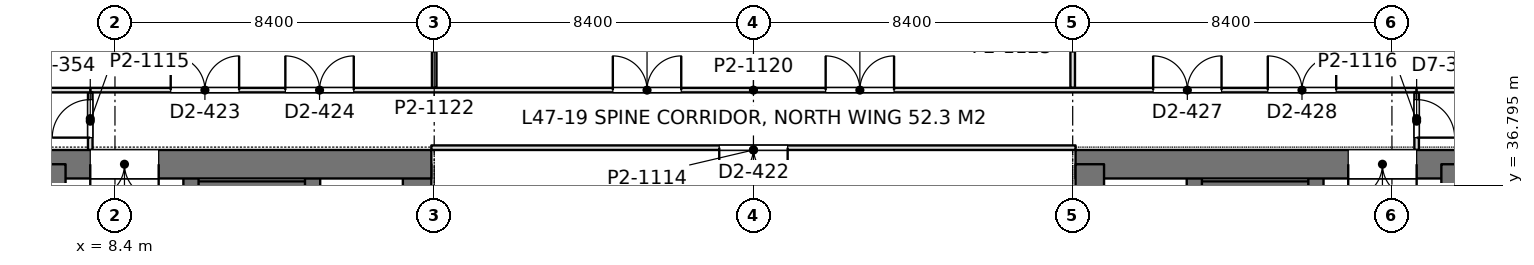
"""IFC4 building model, lengths in metres.
Left out: names, types, materials, properties, quantities, classifications, styles, units other than length and angle.
Written with IfcOpenShell. Run it as: python <this file> out.ifc"""

import sys

from ifc_helpers import new_model, si_unit, direction, frame, frame_2d, origin, place, context, subcontext, project, spatial, rectangle, extrude, element, fill, save


model = new_model("IFC4")
c1 = context("Model", 3, precision=1e-05, world=origin(), true_north=direction((0.0, 1.0)))
c2 = subcontext(c1, "Body", "Model", "MODEL_VIEW")
j1 = project(units=[si_unit("LENGTHUNIT", "METRE"), si_unit("PLANEANGLEUNIT", "RADIAN")], contexts=[c1])
p1 = place(None, origin())
s1 = spatial("IfcSite", under=j1, at=p1, CompositionType="ELEMENT")
p2 = place(p1, origin())
s2 = spatial("IfcBuilding", under=s1, at=p2, CompositionType="ELEMENT")
p3 = place(p2, frame((0.0, 0.0, 207.0)))
s3 = spatial("IfcBuildingStorey", under=s2, at=p3, CompositionType="ELEMENT", Elevation=207.0)
p4 = place(p3, frame((-1.125, 37.35, 0.0), z_axis=(0.0, 0.0, 1.0), x_axis=(1.0, 0.0, 0.0)))
e1 = element("IfcWall", 1, at=p4, inside=s3, PredefinedType="SHEAR", context=c2, shape_type="SweptSolid", body=[
    extrude(rectangle(XDim=17.85, YDim=0.75, at=frame_2d((8.925, 0.0))), origin(), (0.0, 0.0, 1.0), 4.2),
])
p5 = place(p4, frame((8.875, 0.0, 0.0)))
e2 = element("IfcOpeningElement", 2, at=p5, cuts=e1, PredefinedType="OPENING", context=c2, shape_type="SweptSolid", body=[
    extrude(rectangle(XDim=1.8, YDim=2.4, at=frame_2d((0.9, 1.2))), frame((0.0, 0.385, 0.0), z_axis=(0.0, -1.0, 0.0), x_axis=(1.0, 0.0, 0.0)), (0.0, 0.0, 1.0), 0.77),
])
p6 = place(p3, frame((16.35, 27.8, 0.0), z_axis=(0.0, 0.0, 1.0), x_axis=(0.0, 1.0, 0.0)))
e3 = element("IfcWall", 3, at=p6, inside=s3, PredefinedType="SHEAR", context=c2, shape_type="SweptSolid", body=[
    extrude(rectangle(XDim=9.55, YDim=0.75, at=frame_2d((4.775, 0.0))), origin(), (0.0, 0.0, 1.0), 4.2),
])
p7 = place(p3, frame((6.9, 13.05, 0.0), z_axis=(0.0, 0.0, 1.0), x_axis=(0.0, 1.0, 0.0)))
e4 = element("IfcWall", 4, at=p7, inside=s3, PredefinedType="SHEAR", context=c2, shape_type="SweptSolid", body=[
    extrude(rectangle(XDim=24.3, YDim=0.4, at=frame_2d((12.15, 0.0))), origin(), (0.0, 0.0, 1.0), 4.2),
])
p8 = place(p7, frame((1.3, 0.0, 0.0)))
e5 = element("IfcOpeningElement", 5, at=p8, cuts=e4, PredefinedType="OPENING", context=c2, shape_type="SweptSolid", body=[
    extrude(rectangle(XDim=1.0, YDim=2.2, at=frame_2d((0.5, 1.1))), frame((0.0, 0.21, 0.0), z_axis=(0.0, -1.0, 0.0), x_axis=(1.0, 0.0, 0.0)), (0.0, 0.0, 1.0), 0.42),
])
p9 = place(p7, frame((22.0, 0.0, 0.0)))
e6 = element("IfcOpeningElement", 6, at=p9, cuts=e4, PredefinedType="OPENING", context=c2, shape_type="SweptSolid", body=[
    extrude(rectangle(XDim=1.0, YDim=2.2, at=frame_2d((0.5, 1.1))), frame((0.0, 0.21, 0.0), z_axis=(0.0, -1.0, 0.0), x_axis=(1.0, 0.0, 0.0)), (0.0, 0.0, 1.0), 0.42),
])
p10 = place(p7, frame((5.55, 0.0, 0.0)))
e7 = element("IfcOpeningElement", 7, at=p10, cuts=e4, PredefinedType="OPENING", context=c2, shape_type="SweptSolid", body=[
    extrude(rectangle(XDim=1.0, YDim=2.2, at=frame_2d((0.5, 1.1))), frame((0.0, 0.21, 0.0), z_axis=(0.0, -1.0, 0.0), x_axis=(1.0, 0.0, 0.0)), (0.0, 0.0, 1.0), 0.42),
])
p11 = place(p7, frame((9.55, 0.0, 0.0)))
e8 = element("IfcOpeningElement", 8, at=p11, cuts=e4, PredefinedType="OPENING", context=c2, shape_type="SweptSolid", body=[
    extrude(rectangle(XDim=1.0, YDim=2.2, at=frame_2d((0.5, 1.1))), frame((0.0, 0.21, 0.0), z_axis=(0.0, -1.0, 0.0), x_axis=(1.0, 0.0, 0.0)), (0.0, 0.0, 1.0), 0.42),
])
p12 = place(p7, frame((12.8, 0.0, 0.0)))
e9 = element("IfcOpeningElement", 9, at=p12, cuts=e4, PredefinedType="OPENING", context=c2, shape_type="SweptSolid", body=[
    extrude(rectangle(XDim=1.1, YDim=2.2, at=frame_2d((0.55, 1.1))), frame((0.0, 0.21, 0.0), z_axis=(0.0, -1.0, 0.0), x_axis=(1.0, 0.0, 0.0)), (0.0, 0.0, 1.0), 0.42),
])
p13 = place(p7, frame((15.538, 0.0, 0.0)))
e10 = element("IfcOpeningElement", 10, at=p13, cuts=e4, PredefinedType="OPENING", context=c2, shape_type="SweptSolid", body=[
    extrude(rectangle(XDim=1.1, YDim=2.2, at=frame_2d((0.55, 1.1))), frame((0.0, 0.21, 0.0), z_axis=(0.0, -1.0, 0.0), x_axis=(1.0, 0.0, 0.0)), (0.0, 0.0, 1.0), 0.42),
])
p14 = place(p7, frame((18.262, 0.0, 0.0)))
e11 = element("IfcOpeningElement", 11, at=p14, cuts=e4, PredefinedType="OPENING", context=c2, shape_type="SweptSolid", body=[
    extrude(rectangle(XDim=1.1, YDim=2.2, at=frame_2d((0.55, 1.1))), frame((0.0, 0.21, 0.0), z_axis=(0.0, -1.0, 0.0), x_axis=(1.0, 0.0, 0.0)), (0.0, 0.0, 1.0), 0.42),
])
p15 = place(p3, frame((10.4, 13.05, 0.0), z_axis=(0.0, 0.0, 1.0), x_axis=(0.0, 1.0, 0.0)))
e12 = element("IfcWall", 12, at=p15, inside=s3, PredefinedType="SHEAR", context=c2, shape_type="SweptSolid", body=[
    extrude(rectangle(XDim=24.3, YDim=0.4, at=frame_2d((12.15, 0.0))), origin(), (0.0, 0.0, 1.0), 4.2),
])
p16 = place(p15, frame((15.75, 0.0, 0.0)))
e13 = element("IfcOpeningElement", 13, at=p16, cuts=e12, PredefinedType="OPENING", context=c2, shape_type="SweptSolid", body=[
    extrude(rectangle(XDim=1.1, YDim=2.2, at=frame_2d((0.55, 1.1))), frame((0.0, 0.21, 0.0), z_axis=(0.0, -1.0, 0.0), x_axis=(1.0, 0.0, 0.0)), (0.0, 0.0, 1.0), 0.42),
])
p17 = place(p15, frame((18.6, 0.0, 0.0)))
e14 = element("IfcOpeningElement", 14, at=p17, cuts=e12, PredefinedType="OPENING", context=c2, shape_type="SweptSolid", body=[
    extrude(rectangle(XDim=1.1, YDim=2.2, at=frame_2d((0.55, 1.1))), frame((0.0, 0.21, 0.0), z_axis=(0.0, -1.0, 0.0), x_axis=(1.0, 0.0, 0.0)), (0.0, 0.0, 1.0), 0.42),
])
p18 = place(p15, frame((21.45, 0.0, 0.0)))
e15 = element("IfcOpeningElement", 15, at=p18, cuts=e12, PredefinedType="OPENING", context=c2, shape_type="SweptSolid", body=[
    extrude(rectangle(XDim=1.1, YDim=2.2, at=frame_2d((0.55, 1.1))), frame((0.0, 0.21, 0.0), z_axis=(0.0, -1.0, 0.0), x_axis=(1.0, 0.0, 0.0)), (0.0, 0.0, 1.0), 0.42),
])
p19 = place(p15, frame((8.65, 0.0, 0.0)))
e16 = element("IfcOpeningElement", 16, at=p19, cuts=e12, PredefinedType="OPENING", context=c2, shape_type="SweptSolid", body=[
    extrude(rectangle(XDim=1.8, YDim=2.4, at=frame_2d((0.9, 1.2))), frame((0.0, 0.21, 0.0), z_axis=(0.0, -1.0, 0.0), x_axis=(1.0, 0.0, 0.0)), (0.0, 0.0, 1.0), 0.42),
])
p20 = place(p3, frame((13.6, 27.925, 0.0), z_axis=(0.0, 0.0, 1.0), x_axis=(0.0, 1.0, 0.0)))
e17 = element("IfcWall", 17, at=p20, inside=s3, PredefinedType="SHEAR", context=c2, shape_type="SweptSolid", body=[
    extrude(rectangle(XDim=9.425, YDim=0.4, at=frame_2d((4.712, 0.0))), origin(), (0.0, 0.0, 1.0), 4.2),
])
p21 = place(p3, frame((10.4, 36.625, 0.0), z_axis=(0.0, 0.0, 1.0), x_axis=(1.0, 0.0, 0.0)))
e18 = element("IfcWall", 18, at=p21, inside=s3, PredefinedType="SHEAR", context=c2, shape_type="SweptSolid", body=[
    extrude(rectangle(XDim=3.2, YDim=0.55, at=frame_2d((1.6, 0.0))), origin(), (0.0, 0.0, 1.0), 4.2),
])
p22 = place(p3, frame((33.675, 37.35, 0.0), z_axis=(0.0, 0.0, 1.0), x_axis=(1.0, 0.0, 0.0)))
e19 = element("IfcWall", 19, at=p22, inside=s3, PredefinedType="SHEAR", context=c2, shape_type="SweptSolid", body=[
    extrude(rectangle(XDim=17.85, YDim=0.75, at=frame_2d((8.925, 0.0))), origin(), (0.0, 0.0, 1.0), 4.2),
])
p23 = place(p22, frame((7.175, 0.0, 0.0)))
e20 = element("IfcOpeningElement", 20, at=p23, cuts=e19, PredefinedType="OPENING", context=c2, shape_type="SweptSolid", body=[
    extrude(rectangle(XDim=1.8, YDim=2.4, at=frame_2d((0.9, 1.2))), frame((0.0, 0.385, 0.0), z_axis=(0.0, -1.0, 0.0), x_axis=(1.0, 0.0, 0.0)), (0.0, 0.0, 1.0), 0.77),
])
p24 = place(p3, frame((34.05, 27.8, 0.0), z_axis=(0.0, 0.0, 1.0), x_axis=(0.0, 1.0, 0.0)))
e21 = element("IfcWall", 21, at=p24, inside=s3, PredefinedType="SHEAR", context=c2, shape_type="SweptSolid", body=[
    extrude(rectangle(XDim=9.55, YDim=0.75, at=frame_2d((4.775, 0.0))), origin(), (0.0, 0.0, 1.0), 4.2),
])
p25 = place(p3, frame((43.5, 13.05, 0.0), z_axis=(0.0, 0.0, 1.0), x_axis=(0.0, 1.0, 0.0)))
e22 = element("IfcWall", 22, at=p25, inside=s3, PredefinedType="SHEAR", context=c2, shape_type="SweptSolid", body=[
    extrude(rectangle(XDim=24.3, YDim=0.4, at=frame_2d((12.15, 0.0))), origin(), (0.0, 0.0, 1.0), 4.2),
])
p26 = place(p25, frame((1.3, 0.0, 0.0)))
e23 = element("IfcOpeningElement", 23, at=p26, cuts=e22, PredefinedType="OPENING", context=c2, shape_type="SweptSolid", body=[
    extrude(rectangle(XDim=1.0, YDim=2.2, at=frame_2d((0.5, 1.1))), frame((0.0, 0.21, 0.0), z_axis=(0.0, -1.0, 0.0), x_axis=(1.0, 0.0, 0.0)), (0.0, 0.0, 1.0), 0.42),
])
p27 = place(p25, frame((22.0, 0.0, 0.0)))
e24 = element("IfcOpeningElement", 24, at=p27, cuts=e22, PredefinedType="OPENING", context=c2, shape_type="SweptSolid", body=[
    extrude(rectangle(XDim=1.0, YDim=2.2, at=frame_2d((0.5, 1.1))), frame((0.0, 0.21, 0.0), z_axis=(0.0, -1.0, 0.0), x_axis=(1.0, 0.0, 0.0)), (0.0, 0.0, 1.0), 0.42),
])
p28 = place(p25, frame((5.55, 0.0, 0.0)))
e25 = element("IfcOpeningElement", 25, at=p28, cuts=e22, PredefinedType="OPENING", context=c2, shape_type="SweptSolid", body=[
    extrude(rectangle(XDim=1.0, YDim=2.2, at=frame_2d((0.5, 1.1))), frame((0.0, 0.21, 0.0), z_axis=(0.0, -1.0, 0.0), x_axis=(1.0, 0.0, 0.0)), (0.0, 0.0, 1.0), 0.42),
])
p29 = place(p25, frame((9.55, 0.0, 0.0)))
e26 = element("IfcOpeningElement", 26, at=p29, cuts=e22, PredefinedType="OPENING", context=c2, shape_type="SweptSolid", body=[
    extrude(rectangle(XDim=1.0, YDim=2.2, at=frame_2d((0.5, 1.1))), frame((0.0, 0.21, 0.0), z_axis=(0.0, -1.0, 0.0), x_axis=(1.0, 0.0, 0.0)), (0.0, 0.0, 1.0), 0.42),
])
p30 = place(p25, frame((12.8, 0.0, 0.0)))
e27 = element("IfcOpeningElement", 27, at=p30, cuts=e22, PredefinedType="OPENING", context=c2, shape_type="SweptSolid", body=[
    extrude(rectangle(XDim=1.1, YDim=2.2, at=frame_2d((0.55, 1.1))), frame((0.0, 0.21, 0.0), z_axis=(0.0, -1.0, 0.0), x_axis=(1.0, 0.0, 0.0)), (0.0, 0.0, 1.0), 0.42),
])
p31 = place(p25, frame((15.538, 0.0, 0.0)))
e28 = element("IfcOpeningElement", 28, at=p31, cuts=e22, PredefinedType="OPENING", context=c2, shape_type="SweptSolid", body=[
    extrude(rectangle(XDim=1.1, YDim=2.2, at=frame_2d((0.55, 1.1))), frame((0.0, 0.21, 0.0), z_axis=(0.0, -1.0, 0.0), x_axis=(1.0, 0.0, 0.0)), (0.0, 0.0, 1.0), 0.42),
])
p32 = place(p25, frame((18.262, 0.0, 0.0)))
e29 = element("IfcOpeningElement", 29, at=p32, cuts=e22, PredefinedType="OPENING", context=c2, shape_type="SweptSolid", body=[
    extrude(rectangle(XDim=1.1, YDim=2.2, at=frame_2d((0.55, 1.1))), frame((0.0, 0.21, 0.0), z_axis=(0.0, -1.0, 0.0), x_axis=(1.0, 0.0, 0.0)), (0.0, 0.0, 1.0), 0.42),
])
p33 = place(p3, frame((40.0, 13.05, 0.0), z_axis=(0.0, 0.0, 1.0), x_axis=(0.0, 1.0, 0.0)))
e30 = element("IfcWall", 30, at=p33, inside=s3, PredefinedType="SHEAR", context=c2, shape_type="SweptSolid", body=[
    extrude(rectangle(XDim=24.3, YDim=0.4, at=frame_2d((12.15, 0.0))), origin(), (0.0, 0.0, 1.0), 4.2),
])
p34 = place(p33, frame((15.75, 0.0, 0.0)))
e31 = element("IfcOpeningElement", 31, at=p34, cuts=e30, PredefinedType="OPENING", context=c2, shape_type="SweptSolid", body=[
    extrude(rectangle(XDim=1.1, YDim=2.2, at=frame_2d((0.55, 1.1))), frame((0.0, 0.21, 0.0), z_axis=(0.0, -1.0, 0.0), x_axis=(1.0, 0.0, 0.0)), (0.0, 0.0, 1.0), 0.42),
])
p35 = place(p33, frame((18.6, 0.0, 0.0)))
e32 = element("IfcOpeningElement", 32, at=p35, cuts=e30, PredefinedType="OPENING", context=c2, shape_type="SweptSolid", body=[
    extrude(rectangle(XDim=1.1, YDim=2.2, at=frame_2d((0.55, 1.1))), frame((0.0, 0.21, 0.0), z_axis=(0.0, -1.0, 0.0), x_axis=(1.0, 0.0, 0.0)), (0.0, 0.0, 1.0), 0.42),
])
p36 = place(p33, frame((21.45, 0.0, 0.0)))
e33 = element("IfcOpeningElement", 33, at=p36, cuts=e30, PredefinedType="OPENING", context=c2, shape_type="SweptSolid", body=[
    extrude(rectangle(XDim=1.1, YDim=2.2, at=frame_2d((0.55, 1.1))), frame((0.0, 0.21, 0.0), z_axis=(0.0, -1.0, 0.0), x_axis=(1.0, 0.0, 0.0)), (0.0, 0.0, 1.0), 0.42),
])
p37 = place(p33, frame((8.65, 0.0, 0.0)))
e34 = element("IfcOpeningElement", 34, at=p37, cuts=e30, PredefinedType="OPENING", context=c2, shape_type="SweptSolid", body=[
    extrude(rectangle(XDim=1.8, YDim=2.4, at=frame_2d((0.9, 1.2))), frame((0.0, 0.21, 0.0), z_axis=(0.0, -1.0, 0.0), x_axis=(1.0, 0.0, 0.0)), (0.0, 0.0, 1.0), 0.42),
])
p38 = place(p3, frame((36.8, 27.925, 0.0), z_axis=(0.0, 0.0, 1.0), x_axis=(0.0, 1.0, 0.0)))
e35 = element("IfcWall", 35, at=p38, inside=s3, PredefinedType="SHEAR", context=c2, shape_type="SweptSolid", body=[
    extrude(rectangle(XDim=9.425, YDim=0.4, at=frame_2d((4.712, 0.0))), origin(), (0.0, 0.0, 1.0), 4.2),
])
p39 = place(p3, frame((40.0, 36.625, 0.0), z_axis=(0.0, 0.0, 1.0), x_axis=(-1.0, 0.0, 0.0)))
e36 = element("IfcWall", 36, at=p39, inside=s3, PredefinedType="SHEAR", context=c2, shape_type="SweptSolid", body=[
    extrude(rectangle(XDim=3.2, YDim=0.55, at=frame_2d((1.6, 0.0))), origin(), (0.0, 0.0, 1.0), 4.2),
])
for number, where, z_axis, x_axis in (
    (37, (16.8, 39.358, 0.0), (0.0, 0.0, 1.0), (0.0, 1.0, 0.0)),
    (38, (33.6, 39.358, 0.0), (0.0, 0.0, 1.0), (0.0, 1.0, 0.0)),
):
    element("IfcWall", number, at=place(p3, frame(where, z_axis=z_axis, x_axis=x_axis)), inside=s3, PredefinedType="PARTITIONING", context=c2, shape_type="SweptSolid", body=[
        extrude(rectangle(XDim=2.093, YDim=0.12, at=frame_2d((1.046, 0.0))), origin(), (0.0, 0.0, 1.0), 3.69),
    ])
p40 = place(p3, frame((7.748, 39.3, 0.0), z_axis=(0.0, 0.0, 1.0), x_axis=(1.0, 0.0, 0.0)))
e39 = element("IfcWall", 39, at=p40, inside=s3, PredefinedType="PARTITIONING", context=c2, shape_type="SweptSolid", body=[
    extrude(rectangle(XDim=34.904, YDim=0.12, at=frame_2d((17.452, 0.0))), origin(), (0.0, 0.0, 1.0), 3.55),
])
p41 = place(p40, frame((2.119, 0.0, 0.0)))
e40 = element("IfcOpeningElement", 40, at=p41, cuts=e39, PredefinedType="OPENING", context=c2, shape_type="SweptSolid", body=[
    extrude(rectangle(XDim=1.8, YDim=2.2, at=frame_2d((0.9, 1.1))), frame((0.0, 0.07, 0.0), z_axis=(0.0, -1.0, 0.0), x_axis=(1.0, 0.0, 0.0)), (0.0, 0.0, 1.0), 0.14),
])
p42 = place(p40, frame((5.135, 0.0, 0.0)))
e41 = element("IfcOpeningElement", 41, at=p42, cuts=e39, PredefinedType="OPENING", context=c2, shape_type="SweptSolid", body=[
    extrude(rectangle(XDim=1.8, YDim=2.2, at=frame_2d((0.9, 1.1))), frame((0.0, 0.07, 0.0), z_axis=(0.0, -1.0, 0.0), x_axis=(1.0, 0.0, 0.0)), (0.0, 0.0, 1.0), 0.14),
])
p43 = place(p40, frame((13.752, 0.0, 0.0)))
e42 = element("IfcOpeningElement", 42, at=p43, cuts=e39, PredefinedType="OPENING", context=c2, shape_type="SweptSolid", body=[
    extrude(rectangle(XDim=1.8, YDim=2.2, at=frame_2d((0.9, 1.1))), frame((0.0, 0.07, 0.0), z_axis=(0.0, -1.0, 0.0), x_axis=(1.0, 0.0, 0.0)), (0.0, 0.0, 1.0), 0.14),
])
p44 = place(p40, frame((19.352, 0.0, 0.0)))
e43 = element("IfcOpeningElement", 43, at=p44, cuts=e39, PredefinedType="OPENING", context=c2, shape_type="SweptSolid", body=[
    extrude(rectangle(XDim=1.8, YDim=2.2, at=frame_2d((0.9, 1.1))), frame((0.0, 0.07, 0.0), z_axis=(0.0, -1.0, 0.0), x_axis=(1.0, 0.0, 0.0)), (0.0, 0.0, 1.0), 0.14),
])
p45 = place(p40, frame((27.969, 0.0, 0.0)))
e44 = element("IfcOpeningElement", 44, at=p45, cuts=e39, PredefinedType="OPENING", context=c2, shape_type="SweptSolid", body=[
    extrude(rectangle(XDim=1.8, YDim=2.2, at=frame_2d((0.9, 1.1))), frame((0.0, 0.07, 0.0), z_axis=(0.0, -1.0, 0.0), x_axis=(1.0, 0.0, 0.0)), (0.0, 0.0, 1.0), 0.14),
])
p46 = place(p40, frame((30.985, 0.0, 0.0)))
e45 = element("IfcOpeningElement", 45, at=p46, cuts=e39, PredefinedType="OPENING", context=c2, shape_type="SweptSolid", body=[
    extrude(rectangle(XDim=1.8, YDim=2.2, at=frame_2d((0.9, 1.1))), frame((0.0, 0.07, 0.0), z_axis=(0.0, -1.0, 0.0), x_axis=(1.0, 0.0, 0.0)), (0.0, 0.0, 1.0), 0.14),
])
p47 = place(p3, frame((7.75, 37.724, 0.0), z_axis=(0.0, 0.0, 1.0), x_axis=(0.0, 1.0, 0.0)))
e46 = element("IfcWall", 46, at=p47, inside=s3, PredefinedType="PARTITIONING", context=c2, shape_type="SweptSolid", body=[
    extrude(rectangle(XDim=1.518, YDim=0.12, at=frame_2d((0.759, 0.0))), origin(), (0.0, 0.0, 1.0), 4.05),
])
p48 = place(p47, frame((0.326, 0.0, 0.0)))
e47 = element("IfcOpeningElement", 47, at=p48, cuts=e46, PredefinedType="OPENING", context=c2, shape_type="SweptSolid", body=[
    extrude(rectangle(XDim=1.0, YDim=2.4, at=frame_2d((0.5, 1.2))), frame((0.0, 0.07, 0.0), z_axis=(0.0, -1.0, 0.0), x_axis=(1.0, 0.0, 0.0)), (0.0, 0.0, 1.0), 0.14),
])
p49 = place(p3, frame((42.65, 37.724, 0.0), z_axis=(0.0, 0.0, 1.0), x_axis=(0.0, 1.0, 0.0)))
e48 = element("IfcWall", 48, at=p49, inside=s3, PredefinedType="PARTITIONING", context=c2, shape_type="SweptSolid", body=[
    extrude(rectangle(XDim=1.518, YDim=0.12, at=frame_2d((0.759, 0.0))), origin(), (0.0, 0.0, 1.0), 4.05),
])
p50 = place(p49, frame((0.326, 0.0, 0.0)))
e49 = element("IfcOpeningElement", 49, at=p50, cuts=e48, PredefinedType="OPENING", context=c2, shape_type="SweptSolid", body=[
    extrude(rectangle(XDim=1.0, YDim=2.4, at=frame_2d((0.5, 1.2))), frame((0.0, 0.07, 0.0), z_axis=(0.0, -1.0, 0.0), x_axis=(1.0, 0.0, 0.0)), (0.0, 0.0, 1.0), 0.14),
])
for number, where, z_axis, x_axis in (
    (50, (1.2, 39.3, 0.0), (0.0, 0.0, 1.0), (1.0, 0.0, 0.0)),
    (51, (42.648, 39.3, 0.0), (0.0, 0.0, 1.0), (1.0, 0.0, 0.0)),
):
    element("IfcWall", number, at=place(p3, frame(where, z_axis=z_axis, x_axis=x_axis)), inside=s3, PredefinedType="PARTITIONING", context=c2, shape_type="SweptSolid", body=[
        extrude(rectangle(XDim=6.552, YDim=0.12, at=frame_2d((3.276, 0.0))), origin(), (0.0, 0.0, 1.0), 3.69),
    ])
p51 = place(p3, frame((16.725, 37.785, 0.0), z_axis=(0.0, 0.0, 1.0), x_axis=(1.0, 0.0, 0.0)))
e52 = element("IfcWall", 52, at=p51, inside=s3, PredefinedType="PARTITIONING", context=c2, shape_type="SweptSolid", body=[
    extrude(rectangle(XDim=16.95, YDim=0.12, at=frame_2d((8.475, 0.0))), origin(), (0.0, 0.0, 1.0), 3.55),
])
p52 = place(p51, frame((7.575, 0.0, 0.0)))
e53 = element("IfcOpeningElement", 53, at=p52, cuts=e52, PredefinedType="OPENING", context=c2, shape_type="SweptSolid", body=[
    extrude(rectangle(XDim=1.8, YDim=2.2, at=frame_2d((0.9, 1.1))), frame((0.0, 0.07, 0.0), z_axis=(0.0, -1.0, 0.0), x_axis=(1.0, 0.0, 0.0)), (0.0, 0.0, 1.0), 0.14),
])
p53 = place(p5, frame((1.8, 0.0, 0.0), z_axis=(0.0, 0.0, 1.0), x_axis=(-1.0, 0.0, 0.0)))
e54 = element("IfcDoor", 54, at=p53, inside=s3, OperationType="DOUBLE_DOOR_SINGLE_SWING", PredefinedType="DOOR", context=c2, shape_type="SweptSolid", body=[
    extrude(rectangle(XDim=1.8, YDim=2.4, at=frame_2d((0.9, 1.2))), frame((0.0, 0.025, 0.0), z_axis=(0.0, -1.0, 0.0), x_axis=(1.0, 0.0, 0.0)), (0.0, 0.0, 1.0), 0.05),
])
fill(e2, e54)
p54 = place(p23, frame((1.8, 0.0, 0.0), z_axis=(0.0, 0.0, 1.0), x_axis=(-1.0, 0.0, 0.0)))
e55 = element("IfcDoor", 55, at=p54, inside=s3, OperationType="DOUBLE_DOOR_SINGLE_SWING", PredefinedType="DOOR", context=c2, shape_type="SweptSolid", body=[
    extrude(rectangle(XDim=1.8, YDim=2.4, at=frame_2d((0.9, 1.2))), frame((0.0, 0.025, 0.0), z_axis=(0.0, -1.0, 0.0), x_axis=(1.0, 0.0, 0.0)), (0.0, 0.0, 1.0), 0.05),
])
fill(e20, e55)
p55 = place(p41, origin())
e56 = element("IfcDoor", 56, at=p55, inside=s3, OperationType="DOUBLE_DOOR_SINGLE_SWING", PredefinedType="DOOR", context=c2, shape_type="SweptSolid", body=[
    extrude(rectangle(XDim=1.8, YDim=2.2, at=frame_2d((0.9, 1.1))), frame((0.0, 0.025, 0.0), z_axis=(0.0, -1.0, 0.0), x_axis=(1.0, 0.0, 0.0)), (0.0, 0.0, 1.0), 0.05),
])
fill(e40, e56)
p56 = place(p42, origin())
e57 = element("IfcDoor", 57, at=p56, inside=s3, OperationType="DOUBLE_DOOR_SINGLE_SWING", PredefinedType="DOOR", context=c2, shape_type="SweptSolid", body=[
    extrude(rectangle(XDim=1.8, YDim=2.2, at=frame_2d((0.9, 1.1))), frame((0.0, 0.025, 0.0), z_axis=(0.0, -1.0, 0.0), x_axis=(1.0, 0.0, 0.0)), (0.0, 0.0, 1.0), 0.05),
])
fill(e41, e57)
p57 = place(p43, origin())
e58 = element("IfcDoor", 58, at=p57, inside=s3, OperationType="DOUBLE_DOOR_SINGLE_SWING", PredefinedType="DOOR", context=c2, shape_type="SweptSolid", body=[
    extrude(rectangle(XDim=1.8, YDim=2.2, at=frame_2d((0.9, 1.1))), frame((0.0, 0.025, 0.0), z_axis=(0.0, -1.0, 0.0), x_axis=(1.0, 0.0, 0.0)), (0.0, 0.0, 1.0), 0.05),
])
fill(e42, e58)
p58 = place(p44, origin())
e59 = element("IfcDoor", 59, at=p58, inside=s3, OperationType="DOUBLE_DOOR_SINGLE_SWING", PredefinedType="DOOR", context=c2, shape_type="SweptSolid", body=[
    extrude(rectangle(XDim=1.8, YDim=2.2, at=frame_2d((0.9, 1.1))), frame((0.0, 0.025, 0.0), z_axis=(0.0, -1.0, 0.0), x_axis=(1.0, 0.0, 0.0)), (0.0, 0.0, 1.0), 0.05),
])
fill(e43, e59)
p59 = place(p45, origin())
e60 = element("IfcDoor", 60, at=p59, inside=s3, OperationType="DOUBLE_DOOR_SINGLE_SWING", PredefinedType="DOOR", context=c2, shape_type="SweptSolid", body=[
    extrude(rectangle(XDim=1.8, YDim=2.2, at=frame_2d((0.9, 1.1))), frame((0.0, 0.025, 0.0), z_axis=(0.0, -1.0, 0.0), x_axis=(1.0, 0.0, 0.0)), (0.0, 0.0, 1.0), 0.05),
])
fill(e44, e60)
p60 = place(p46, origin())
e61 = element("IfcDoor", 61, at=p60, inside=s3, OperationType="DOUBLE_DOOR_SINGLE_SWING", PredefinedType="DOOR", context=c2, shape_type="SweptSolid", body=[
    extrude(rectangle(XDim=1.8, YDim=2.2, at=frame_2d((0.9, 1.1))), frame((0.0, 0.025, 0.0), z_axis=(0.0, -1.0, 0.0), x_axis=(1.0, 0.0, 0.0)), (0.0, 0.0, 1.0), 0.05),
])
fill(e45, e61)
p61 = place(p48, origin())
e62 = element("IfcDoor", 62, at=p61, inside=s3, OperationType="SINGLE_SWING_LEFT", PredefinedType="DOOR", context=c2, shape_type="SweptSolid", body=[
    extrude(rectangle(XDim=1.0, YDim=2.4, at=frame_2d((0.5, 1.2))), frame((0.0, 0.025, 0.0), z_axis=(0.0, -1.0, 0.0), x_axis=(1.0, 0.0, 0.0)), (0.0, 0.0, 1.0), 0.05),
])
fill(e47, e62)
p62 = place(p50, frame((1.0, 0.0, 0.0), z_axis=(0.0, 0.0, 1.0), x_axis=(-1.0, 0.0, 0.0)))
e63 = element("IfcDoor", 63, at=p62, inside=s3, OperationType="SINGLE_SWING_RIGHT", PredefinedType="DOOR", context=c2, shape_type="SweptSolid", body=[
    extrude(rectangle(XDim=1.0, YDim=2.4, at=frame_2d((0.5, 1.2))), frame((0.0, 0.025, 0.0), z_axis=(0.0, -1.0, 0.0), x_axis=(1.0, 0.0, 0.0)), (0.0, 0.0, 1.0), 0.05),
])
fill(e49, e63)
p63 = place(p52, frame((1.8, 0.0, 0.0), z_axis=(0.0, 0.0, 1.0), x_axis=(-1.0, 0.0, 0.0)))
e64 = element("IfcDoor", 64, at=p63, inside=s3, OperationType="DOUBLE_DOOR_SINGLE_SWING", PredefinedType="DOOR", context=c2, shape_type="SweptSolid", body=[
    extrude(rectangle(XDim=1.8, YDim=2.2, at=frame_2d((0.9, 1.1))), frame((0.0, 0.025, 0.0), z_axis=(0.0, -1.0, 0.0), x_axis=(1.0, 0.0, 0.0)), (0.0, 0.0, 1.0), 0.05),
])
fill(e53, e64)
save(model, sys.argv[1])
